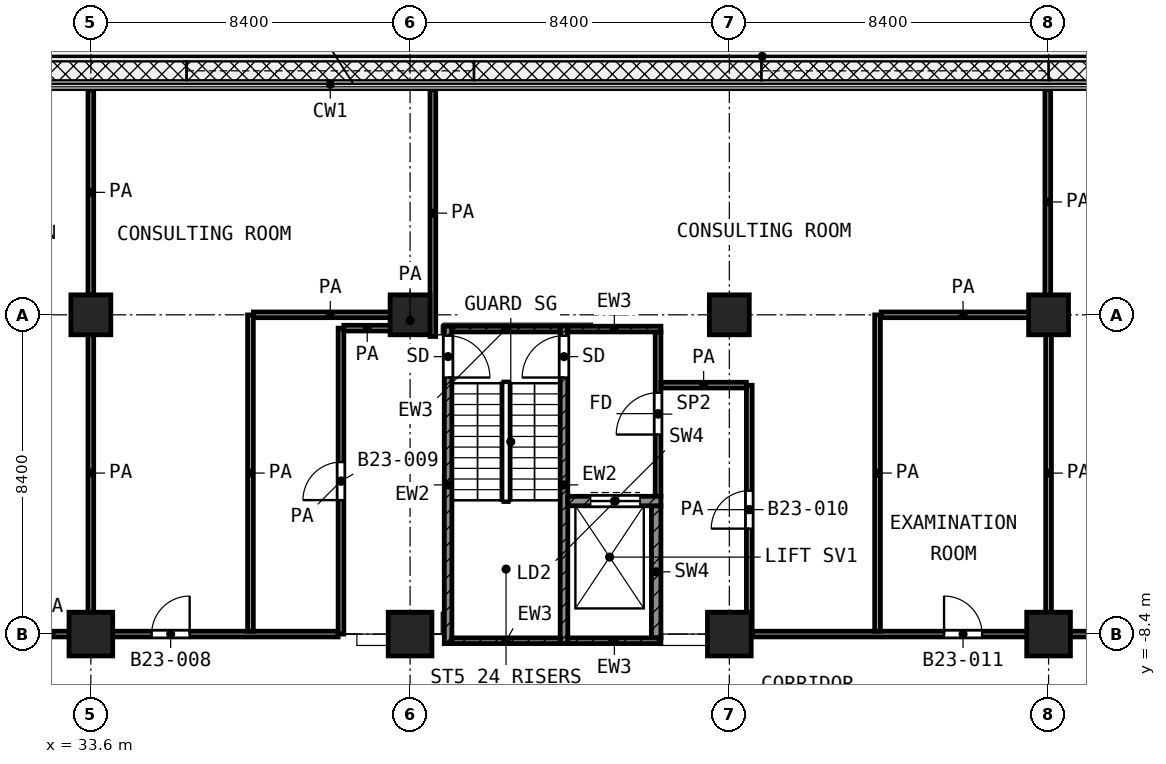
"""IFC4 building model, lengths in metres.
Left out: names, types, materials, properties, quantities, classifications, styles, units other than length and angle.
Written with IfcOpenShell. Run it as: python <this file> out.ifc"""

import sys

from ifc_helpers import new_model, si_unit, direction, frame, frame_2d, origin, origin_2d, place, context, subcontext, project, spatial, rectangle, extrude, element, fill, save


model = new_model("IFC4")
c1 = context("Model", 3, precision=1e-05, world=origin(), true_north=direction((0.0, 1.0)))
c2 = subcontext(c1, "Body", "Model", "MODEL_VIEW")
j1 = project(units=[si_unit("LENGTHUNIT", "METRE"), si_unit("PLANEANGLEUNIT", "RADIAN")], contexts=[c1])
p1 = place(None, origin())
s1 = spatial("IfcSite", under=j1, at=p1, CompositionType="ELEMENT")
p2 = place(p1, origin())
s2 = spatial("IfcBuilding", under=s1, at=p2, CompositionType="ELEMENT")
p3 = place(p2, frame((0.0, 0.0, 103.0)))
s3 = spatial("IfcBuildingStorey", under=s2, at=p3, CompositionType="ELEMENT", Elevation=103.0)
for number, where, z_axis, x_axis in (
    (1, (33.6, 0.0, 0.0), (0.0, 0.0, 1.0), (1.0, 0.0, 0.0)),
    (2, (42.0, 0.0, 0.0), (0.0, 0.0, 1.0), (1.0, 0.0, 0.0)),
    (3, (50.4, 0.0, 0.0), (0.0, 0.0, 1.0), (1.0, 0.0, 0.0)),
    (4, (58.8, 0.0, 0.0), (0.0, 0.0, 1.0), (1.0, 0.0, 0.0)),
):
    element("IfcColumn", number, at=place(p3, frame(where, z_axis=z_axis, x_axis=x_axis)), inside=s3, PredefinedType="COLUMN", context=c2, shape_type="SweptSolid", body=[
        extrude(rectangle(XDim=1.05, YDim=1.05, at=origin_2d()), origin(), (0.0, 0.0, 1.0), 4.2),
    ])
for number, where, z_axis, x_axis in (
    (5, (33.6, -8.4, 0.0), (0.0, 0.0, 1.0), (1.0, 0.0, 0.0)),
    (6, (42.0, -8.4, 0.0), (0.0, 0.0, 1.0), (1.0, 0.0, 0.0)),
    (7, (50.4, -8.4, 0.0), (0.0, 0.0, 1.0), (1.0, 0.0, 0.0)),
    (8, (58.8, -8.4, 0.0), (0.0, 0.0, 1.0), (1.0, 0.0, 0.0)),
):
    element("IfcColumn", number, at=place(p3, frame(where, z_axis=z_axis, x_axis=x_axis)), inside=s3, PredefinedType="COLUMN", context=c2, shape_type="SweptSolid", body=[
        extrude(rectangle(XDim=1.15, YDim=1.15, at=origin_2d()), origin(), (0.0, 0.0, 1.0), 4.2),
    ])
p4 = place(p3, frame((43.0, -8.65, 0.0), z_axis=(0.0, 0.0, 1.0), x_axis=(0.0, 1.0, 0.0)))
e9 = element("IfcWall", 9, at=p4, inside=s3, PredefinedType="SHEAR", context=c2, shape_type="SweptSolid", body=[
    extrude(rectangle(XDim=8.35, YDim=0.2, at=frame_2d((4.175, 0.0))), origin(), (0.0, 0.0, 1.0), 3.6),
])
p5 = place(p4, frame((7.0, 0.0, 0.0)))
e10 = element("IfcOpeningElement", 10, at=p5, cuts=e9, PredefinedType="OPENING", context=c2, shape_type="SweptSolid", body=[
    extrude(rectangle(XDim=1.1, YDim=2.1, at=frame_2d((0.55, 1.05))), frame((0.0, 0.11, 0.0), z_axis=(0.0, -1.0, 0.0), x_axis=(1.0, 0.0, 0.0)), (0.0, 0.0, 1.0), 0.22),
])
p6 = place(p3, frame((46.05, -8.65, 0.0), z_axis=(0.0, 0.0, 1.0), x_axis=(0.0, 1.0, 0.0)))
e11 = element("IfcWall", 11, at=p6, inside=s3, PredefinedType="SHEAR", context=c2, shape_type="SweptSolid", body=[
    extrude(rectangle(XDim=8.35, YDim=0.2, at=frame_2d((4.175, 0.0))), origin(), (0.0, 0.0, 1.0), 3.6),
])
p7 = place(p6, frame((7.0, 0.0, 0.0)))
e12 = element("IfcOpeningElement", 12, at=p7, cuts=e11, PredefinedType="OPENING", context=c2, shape_type="SweptSolid", body=[
    extrude(rectangle(XDim=1.1, YDim=2.1, at=frame_2d((0.55, 1.05))), frame((0.0, 0.11, 0.0), z_axis=(0.0, -1.0, 0.0), x_axis=(1.0, 0.0, 0.0)), (0.0, 0.0, 1.0), 0.22),
])
p8 = place(p3, frame((43.1, -0.375, 0.0), z_axis=(0.0, 0.0, 1.0), x_axis=(1.0, 0.0, 0.0)))
e13 = element("IfcWall", 13, at=p8, inside=s3, PredefinedType="SHEAR", context=c2, shape_type="SweptSolid", body=[
    extrude(rectangle(XDim=2.85, YDim=0.15, at=frame_2d((1.425, 0.0))), origin(), (0.0, 0.0, 1.0), 3.6),
])
p9 = place(p3, frame((46.15, -0.375, 0.0), z_axis=(0.0, 0.0, 1.0), x_axis=(1.0, 0.0, 0.0)))
e14 = element("IfcWall", 14, at=p9, inside=s3, PredefinedType="SHEAR", context=c2, shape_type="SweptSolid", body=[
    extrude(rectangle(XDim=2.45, YDim=0.15, at=frame_2d((1.225, 0.0))), origin(), (0.0, 0.0, 1.0), 3.6),
])
p10 = place(p3, frame((43.1, -8.575, 0.0), z_axis=(0.0, 0.0, 1.0), x_axis=(1.0, 0.0, 0.0)))
e15 = element("IfcWall", 15, at=p10, inside=s3, PredefinedType="SHEAR", context=c2, shape_type="SweptSolid", body=[
    extrude(rectangle(XDim=2.85, YDim=0.15, at=frame_2d((1.425, 0.0))), origin(), (0.0, 0.0, 1.0), 3.6),
])
p11 = place(p3, frame((46.15, -8.575, 0.0), z_axis=(0.0, 0.0, 1.0), x_axis=(1.0, 0.0, 0.0)))
e16 = element("IfcWall", 16, at=p11, inside=s3, PredefinedType="SHEAR", context=c2, shape_type="SweptSolid", body=[
    extrude(rectangle(XDim=2.45, YDim=0.15, at=frame_2d((1.225, 0.0))), origin(), (0.0, 0.0, 1.0), 3.6),
])
p12 = place(p3, frame((46.15, -4.9, 0.0), z_axis=(0.0, 0.0, 1.0), x_axis=(1.0, 0.0, 0.0)))
e17 = element("IfcWall", 17, at=p12, inside=s3, PredefinedType="SHEAR", context=c2, shape_type="SweptSolid", body=[
    extrude(rectangle(XDim=2.45, YDim=0.25, at=frame_2d((1.225, 0.0))), origin(), (0.0, 0.0, 1.0), 3.6),
])
p13 = place(p12, frame((0.6, 0.0, 0.0)))
e18 = element("IfcOpeningElement", 18, at=p13, cuts=e17, PredefinedType="OPENING", context=c2, shape_type="SweptSolid", body=[
    extrude(rectangle(XDim=1.3, YDim=2.1, at=frame_2d((0.65, 1.05))), frame((0.0, 0.135, 0.0), z_axis=(0.0, -1.0, 0.0), x_axis=(1.0, 0.0, 0.0)), (0.0, 0.0, 1.0), 0.27),
])
p14 = place(p3, frame((48.475, -8.5, 0.0), z_axis=(0.0, 0.0, 1.0), x_axis=(0.0, 1.0, 0.0)))
e19 = element("IfcWall", 19, at=p14, inside=s3, PredefinedType="SHEAR", context=c2, shape_type="SweptSolid", body=[
    extrude(rectangle(XDim=3.475, YDim=0.25, at=frame_2d((1.738, 0.0))), origin(), (0.0, 0.0, 1.0), 3.6),
])
p15 = place(p3, frame((48.525, -4.775, 0.0), z_axis=(0.0, 0.0, 1.0), x_axis=(0.0, 1.0, 0.0)))
e20 = element("IfcWall", 20, at=p15, inside=s3, PredefinedType="PARTITIONING", context=c2, shape_type="SweptSolid", body=[
    extrude(rectangle(XDim=4.325, YDim=0.15, at=frame_2d((2.163, 0.0))), origin(), (0.0, 0.0, 1.0), 3.6),
])
p16 = place(p15, frame((1.625, 0.0, 0.0)))
e21 = element("IfcOpeningElement", 21, at=p16, cuts=e20, PredefinedType="OPENING", context=c2, shape_type="SweptSolid", body=[
    extrude(rectangle(XDim=1.1, YDim=2.1, at=frame_2d((0.55, 1.05))), frame((0.0, 0.085, 0.0), z_axis=(0.0, -1.0, 0.0), x_axis=(1.0, 0.0, 0.0)), (0.0, 0.0, 1.0), 0.17),
])
p17 = place(p3, frame((25.0, -8.4, 0.0), z_axis=(0.0, 0.0, 1.0), x_axis=(1.0, 0.0, 0.0)))
e22 = element("IfcWall", 22, at=p17, inside=s3, PredefinedType="PARTITIONING", context=c2, shape_type="SweptSolid", body=[
    extrude(rectangle(XDim=15.107, YDim=0.15, at=frame_2d((7.553, 0.0))), origin(), (0.0, 0.0, 1.0), 3.6),
])
p18 = place(p17, frame((10.2, 0.0, 0.0)))
e23 = element("IfcOpeningElement", 23, at=p18, cuts=e22, PredefinedType="OPENING", context=c2, shape_type="SweptSolid", body=[
    extrude(rectangle(XDim=1.0, YDim=2.1, at=frame_2d((0.5, 1.05))), frame((0.0, 0.085, 0.0), z_axis=(0.0, -1.0, 0.0), x_axis=(1.0, 0.0, 0.0)), (0.0, 0.0, 1.0), 0.17),
])
p19 = place(p17, frame((0.75, 0.0, 0.0)))
e24 = element("IfcOpeningElement", 24, at=p19, cuts=e22, PredefinedType="OPENING", context=c2, shape_type="SweptSolid", body=[
    extrude(rectangle(XDim=1.0, YDim=2.1, at=frame_2d((0.5, 1.05))), frame((0.0, 0.085, 0.0), z_axis=(0.0, -1.0, 0.0), x_axis=(1.0, 0.0, 0.0)), (0.0, 0.0, 1.0), 0.17),
])
p20 = place(p17, frame((4.85, 0.0, 0.0)))
e25 = element("IfcOpeningElement", 25, at=p20, cuts=e22, PredefinedType="OPENING", context=c2, shape_type="SweptSolid", body=[
    extrude(rectangle(XDim=1.2, YDim=2.1, at=frame_2d((0.6, 1.05))), frame((0.0, 0.085, 0.0), z_axis=(0.0, -1.0, 0.0), x_axis=(1.0, 0.0, 0.0)), (0.0, 0.0, 1.0), 0.17),
])
p21 = place(p3, frame((51.0, -8.4, 0.0), z_axis=(0.0, 0.0, 1.0), x_axis=(1.0, 0.0, 0.0)))
e26 = element("IfcWall", 26, at=p21, inside=s3, PredefinedType="PARTITIONING", context=c2, shape_type="SweptSolid", body=[
    extrude(rectangle(XDim=24.025, YDim=0.15, at=frame_2d((12.012, 0.0))), origin(), (0.0, 0.0, 1.0), 3.6),
])
p22 = place(p21, frame((5.05, 0.0, 0.0)))
e27 = element("IfcOpeningElement", 27, at=p22, cuts=e26, PredefinedType="OPENING", context=c2, shape_type="SweptSolid", body=[
    extrude(rectangle(XDim=1.0, YDim=2.1, at=frame_2d((0.5, 1.05))), frame((0.0, 0.085, 0.0), z_axis=(0.0, -1.0, 0.0), x_axis=(1.0, 0.0, 0.0)), (0.0, 0.0, 1.0), 0.17),
])
p23 = place(p21, frame((9.55, 0.0, 0.0)))
e28 = element("IfcOpeningElement", 28, at=p23, cuts=e26, PredefinedType="OPENING", context=c2, shape_type="SweptSolid", body=[
    extrude(rectangle(XDim=1.0, YDim=2.1, at=frame_2d((0.5, 1.05))), frame((0.0, 0.085, 0.0), z_axis=(0.0, -1.0, 0.0), x_axis=(1.0, 0.0, 0.0)), (0.0, 0.0, 1.0), 0.17),
])
p24 = place(p21, frame((13.75, 0.0, 0.0)))
e29 = element("IfcOpeningElement", 29, at=p24, cuts=e26, PredefinedType="OPENING", context=c2, shape_type="SweptSolid", body=[
    extrude(rectangle(XDim=1.0, YDim=2.1, at=frame_2d((0.5, 1.05))), frame((0.0, 0.085, 0.0), z_axis=(0.0, -1.0, 0.0), x_axis=(1.0, 0.0, 0.0)), (0.0, 0.0, 1.0), 0.17),
])
p25 = place(p21, frame((17.5, 0.0, 0.0)))
e30 = element("IfcOpeningElement", 30, at=p25, cuts=e26, PredefinedType="OPENING", context=c2, shape_type="SweptSolid", body=[
    extrude(rectangle(XDim=1.0, YDim=2.1, at=frame_2d((0.5, 1.05))), frame((0.0, 0.085, 0.0), z_axis=(0.0, -1.0, 0.0), x_axis=(1.0, 0.0, 0.0)), (0.0, 0.0, 1.0), 0.17),
])
p26 = place(p21, frame((21.462, 0.0, 0.0)))
e31 = element("IfcOpeningElement", 31, at=p26, cuts=e26, PredefinedType="OPENING", context=c2, shape_type="SweptSolid", body=[
    extrude(rectangle(XDim=0.9, YDim=2.1, at=frame_2d((0.45, 1.05))), frame((0.0, 0.085, 0.0), z_axis=(0.0, -1.0, 0.0), x_axis=(1.0, 0.0, 0.0)), (0.0, 0.0, 1.0), 0.17),
])
p27 = place(p3, frame((48.6, -1.85, 0.0), z_axis=(0.0, 0.0, 1.0), x_axis=(1.0, 0.0, 0.0)))
e32 = element("IfcWall", 32, at=p27, inside=s3, PredefinedType="PARTITIONING", context=c2, shape_type="SweptSolid", body=[
    extrude(rectangle(XDim=2.248, YDim=0.15, at=frame_2d((1.124, 0.0))), origin(), (0.0, 0.0, 1.0), 3.6),
])
p28 = place(p3, frame((40.257, -0.35, 0.0), z_axis=(0.0, 0.0, 1.0), x_axis=(1.0, 0.0, 0.0)))
e33 = element("IfcWall", 33, at=p28, inside=s3, PredefinedType="PARTITIONING", context=c2, shape_type="SweptSolid", body=[
    extrude(rectangle(XDim=1.231, YDim=0.15, at=frame_2d((0.615, 0.0))), origin(), (0.0, 0.0, 1.0), 3.6),
])
p29 = place(p3, frame((37.878, 0.0, 0.0), z_axis=(0.0, 0.0, 1.0), x_axis=(1.0, 0.0, 0.0)))
e34 = element("IfcWall", 34, at=p29, inside=s3, PredefinedType="PARTITIONING", context=c2, shape_type="SweptSolid", body=[
    extrude(rectangle(XDim=4.045, YDim=0.15, at=frame_2d((2.022, 0.0))), origin(), (0.0, 0.0, 1.0), 3.6),
])
p30 = place(p3, frame((54.395, 0.0, 0.0), z_axis=(0.0, 0.0, 1.0), x_axis=(1.0, 0.0, 0.0)))
e35 = element("IfcWall", 35, at=p30, inside=s3, PredefinedType="PARTITIONING", context=c2, shape_type="SweptSolid", body=[
    extrude(rectangle(XDim=4.31, YDim=0.15, at=frame_2d((2.155, 0.0))), origin(), (0.0, 0.0, 1.0), 3.6),
])
p31 = place(p3, frame((33.6, -8.325, 0.0), z_axis=(0.0, 0.0, 1.0), x_axis=(0.0, 1.0, 0.0)))
e36 = element("IfcWall", 36, at=p31, inside=s3, PredefinedType="PARTITIONING", context=c2, shape_type="SweptSolid", body=[
    extrude(rectangle(XDim=8.322, YDim=0.15, at=frame_2d((4.161, 0.0))), origin(), (0.0, 0.0, 1.0), 3.6),
])
p32 = place(p3, frame((33.6, 0.525, 0.0), z_axis=(0.0, 0.0, 1.0), x_axis=(0.0, 1.0, 0.0)))
e37 = element("IfcWall", 37, at=p32, inside=s3, PredefinedType="PARTITIONING", context=c2, shape_type="SweptSolid", body=[
    extrude(rectangle(XDim=5.395, YDim=0.15, at=frame_2d((2.698, 0.0))), origin(), (0.0, 0.0, 1.0), 3.6),
])
p33 = place(p3, frame((37.8, -8.325, 0.0), z_axis=(0.0, 0.0, 1.0), x_axis=(0.0, 1.0, 0.0)))
e38 = element("IfcWall", 38, at=p33, inside=s3, PredefinedType="PARTITIONING", context=c2, shape_type="SweptSolid", body=[
    extrude(rectangle(XDim=8.323, YDim=0.15, at=frame_2d((4.162, 0.0))), origin(), (0.0, 0.0, 1.0), 3.6),
])
p34 = place(p3, frame((40.182, -8.4, 0.0), z_axis=(0.0, 0.0, 1.0), x_axis=(0.0, 1.0, 0.0)))
e39 = element("IfcWall", 39, at=p34, inside=s3, PredefinedType="PARTITIONING", context=c2, shape_type="SweptSolid", body=[
    extrude(rectangle(XDim=8.05, YDim=0.15, at=frame_2d((4.025, 0.0))), origin(), (0.0, 0.0, 1.0), 3.6),
])
p35 = place(p34, frame((3.525, 0.0, 0.0)))
e40 = element("IfcOpeningElement", 40, at=p35, cuts=e39, PredefinedType="OPENING", context=c2, shape_type="SweptSolid", body=[
    extrude(rectangle(XDim=1.0, YDim=2.1, at=frame_2d((0.5, 1.05))), frame((0.0, 0.085, 0.0), z_axis=(0.0, -1.0, 0.0), x_axis=(1.0, 0.0, 0.0)), (0.0, 0.0, 1.0), 0.17),
])
p36 = place(p3, frame((42.0, -0.3, 0.0), z_axis=(0.0, 0.0, 1.0), x_axis=(0.0, 1.0, 0.0)))
e41 = element("IfcWall", 41, at=p36, inside=s3, PredefinedType="PARTITIONING", context=c2, shape_type="SweptSolid", body=[
    extrude(rectangle(XDim=0.298, YDim=0.15, at=frame_2d((0.149, 0.0))), origin(), (0.0, 0.0, 1.0), 3.6),
])
p37 = place(p3, frame((42.6, -0.57, 0.0), z_axis=(0.0, 0.0, 1.0), x_axis=(0.0, 1.0, 0.0)))
e42 = element("IfcWall", 42, at=p37, inside=s3, PredefinedType="PARTITIONING", context=c2, shape_type="SweptSolid", body=[
    extrude(rectangle(XDim=6.49, YDim=0.15, at=frame_2d((3.245, 0.0))), origin(), (0.0, 0.0, 1.0), 3.6),
])
p38 = place(p3, frame((50.925, -8.4, 0.0), z_axis=(0.0, 0.0, 1.0), x_axis=(0.0, 1.0, 0.0)))
e43 = element("IfcWall", 43, at=p38, inside=s3, PredefinedType="PARTITIONING", context=c2, shape_type="SweptSolid", body=[
    extrude(rectangle(XDim=6.547, YDim=0.15, at=frame_2d((3.273, 0.0))), origin(), (0.0, 0.0, 1.0), 3.6),
])
p39 = place(p38, frame((2.774, 0.0, 0.0)))
e44 = element("IfcOpeningElement", 44, at=p39, cuts=e43, PredefinedType="OPENING", context=c2, shape_type="SweptSolid", body=[
    extrude(rectangle(XDim=1.0, YDim=2.1, at=frame_2d((0.5, 1.05))), frame((0.0, 0.085, 0.0), z_axis=(0.0, -1.0, 0.0), x_axis=(1.0, 0.0, 0.0)), (0.0, 0.0, 1.0), 0.17),
])
p40 = place(p3, frame((54.3, -8.325, 0.0), z_axis=(0.0, 0.0, 1.0), x_axis=(0.0, 1.0, 0.0)))
e45 = element("IfcWall", 45, at=p40, inside=s3, PredefinedType="PARTITIONING", context=c2, shape_type="SweptSolid", body=[
    extrude(rectangle(XDim=8.323, YDim=0.15, at=frame_2d((4.162, 0.0))), origin(), (0.0, 0.0, 1.0), 3.6),
])
p41 = place(p3, frame((58.78, 0.02, 0.0), z_axis=(0.0, 0.0, 1.0), x_axis=(0.0, 1.0, 0.0)))
e46 = element("IfcWall", 46, at=p41, inside=s3, PredefinedType="PARTITIONING", context=c2, shape_type="SweptSolid", body=[
    extrude(rectangle(XDim=5.9, YDim=0.15, at=frame_2d((2.95, 0.0))), origin(), (0.0, 0.0, 1.0), 3.6),
])
p42 = place(p3, frame((58.8, -8.325, 0.0), z_axis=(0.0, 0.0, 1.0), x_axis=(0.0, 1.0, 0.0)))
e47 = element("IfcWall", 47, at=p42, inside=s3, PredefinedType="PARTITIONING", context=c2, shape_type="SweptSolid", body=[
    extrude(rectangle(XDim=8.321, YDim=0.15, at=frame_2d((4.161, 0.0))), origin(), (0.0, 0.0, 1.0), 3.6),
])
p43 = place(p5, frame((1.1, 0.0, 0.0), z_axis=(0.0, 0.0, 1.0), x_axis=(-1.0, 0.0, 0.0)))
e48 = element("IfcDoor", 48, at=p43, inside=s3, OperationType="SINGLE_SWING_LEFT", PredefinedType="DOOR", context=c2, shape_type="SweptSolid", body=[
    extrude(rectangle(XDim=1.1, YDim=2.1, at=frame_2d((0.55, 1.05))), frame((0.0, 0.025, 0.0), z_axis=(0.0, -1.0, 0.0), x_axis=(1.0, 0.0, 0.0)), (0.0, 0.0, 1.0), 0.05),
])
fill(e10, e48)
p44 = place(p7, origin())
e49 = element("IfcDoor", 49, at=p44, inside=s3, OperationType="SINGLE_SWING_LEFT", PredefinedType="DOOR", context=c2, shape_type="SweptSolid", body=[
    extrude(rectangle(XDim=1.1, YDim=2.1, at=frame_2d((0.55, 1.05))), frame((0.0, 0.025, 0.0), z_axis=(0.0, -1.0, 0.0), x_axis=(1.0, 0.0, 0.0)), (0.0, 0.0, 1.0), 0.05),
])
fill(e12, e49)
p45 = place(p13, origin())
e50 = element("IfcDoor", 50, at=p45, inside=s3, OperationType="DOUBLE_DOOR_SLIDING", PredefinedType="DOOR", context=c2, shape_type="SweptSolid", body=[
    extrude(rectangle(XDim=1.3, YDim=2.1, at=frame_2d((0.65, 1.05))), frame((0.0, 0.025, 0.0), z_axis=(0.0, -1.0, 0.0), x_axis=(1.0, 0.0, 0.0)), (0.0, 0.0, 1.0), 0.05),
])
fill(e18, e50)
p46 = place(p16, origin())
e51 = element("IfcDoor", 51, at=p46, inside=s3, OperationType="SINGLE_SWING_LEFT", PredefinedType="DOOR", context=c2, shape_type="SweptSolid", body=[
    extrude(rectangle(XDim=1.1, YDim=2.1, at=frame_2d((0.55, 1.05))), frame((0.0, 0.025, 0.0), z_axis=(0.0, -1.0, 0.0), x_axis=(1.0, 0.0, 0.0)), (0.0, 0.0, 1.0), 0.05),
])
fill(e21, e51)
p47 = place(p18, origin())
e52 = element("IfcDoor", 52, at=p47, inside=s3, OperationType="SINGLE_SWING_RIGHT", PredefinedType="DOOR", context=c2, shape_type="SweptSolid", body=[
    extrude(rectangle(XDim=1.0, YDim=2.1, at=frame_2d((0.5, 1.05))), frame((0.0, 0.025, 0.0), z_axis=(0.0, -1.0, 0.0), x_axis=(1.0, 0.0, 0.0)), (0.0, 0.0, 1.0), 0.05),
])
fill(e23, e52)
p48 = place(p35, origin())
e53 = element("IfcDoor", 53, at=p48, inside=s3, OperationType="SINGLE_SWING_LEFT", PredefinedType="DOOR", context=c2, shape_type="SweptSolid", body=[
    extrude(rectangle(XDim=1.0, YDim=2.1, at=frame_2d((0.5, 1.05))), frame((0.0, 0.025, 0.0), z_axis=(0.0, -1.0, 0.0), x_axis=(1.0, 0.0, 0.0)), (0.0, 0.0, 1.0), 0.05),
])
fill(e40, e53)
p49 = place(p39, origin())
e54 = element("IfcDoor", 54, at=p49, inside=s3, OperationType="SINGLE_SWING_LEFT", PredefinedType="DOOR", context=c2, shape_type="SweptSolid", body=[
    extrude(rectangle(XDim=1.0, YDim=2.1, at=frame_2d((0.5, 1.05))), frame((0.0, 0.025, 0.0), z_axis=(0.0, -1.0, 0.0), x_axis=(1.0, 0.0, 0.0)), (0.0, 0.0, 1.0), 0.05),
])
fill(e44, e54)
p50 = place(p22, origin())
e55 = element("IfcDoor", 55, at=p50, inside=s3, OperationType="SINGLE_SWING_LEFT", PredefinedType="DOOR", context=c2, shape_type="SweptSolid", body=[
    extrude(rectangle(XDim=1.0, YDim=2.1, at=frame_2d((0.5, 1.05))), frame((0.0, 0.025, 0.0), z_axis=(0.0, -1.0, 0.0), x_axis=(1.0, 0.0, 0.0)), (0.0, 0.0, 1.0), 0.05),
])
fill(e27, e55)
save(model, sys.argv[1])
